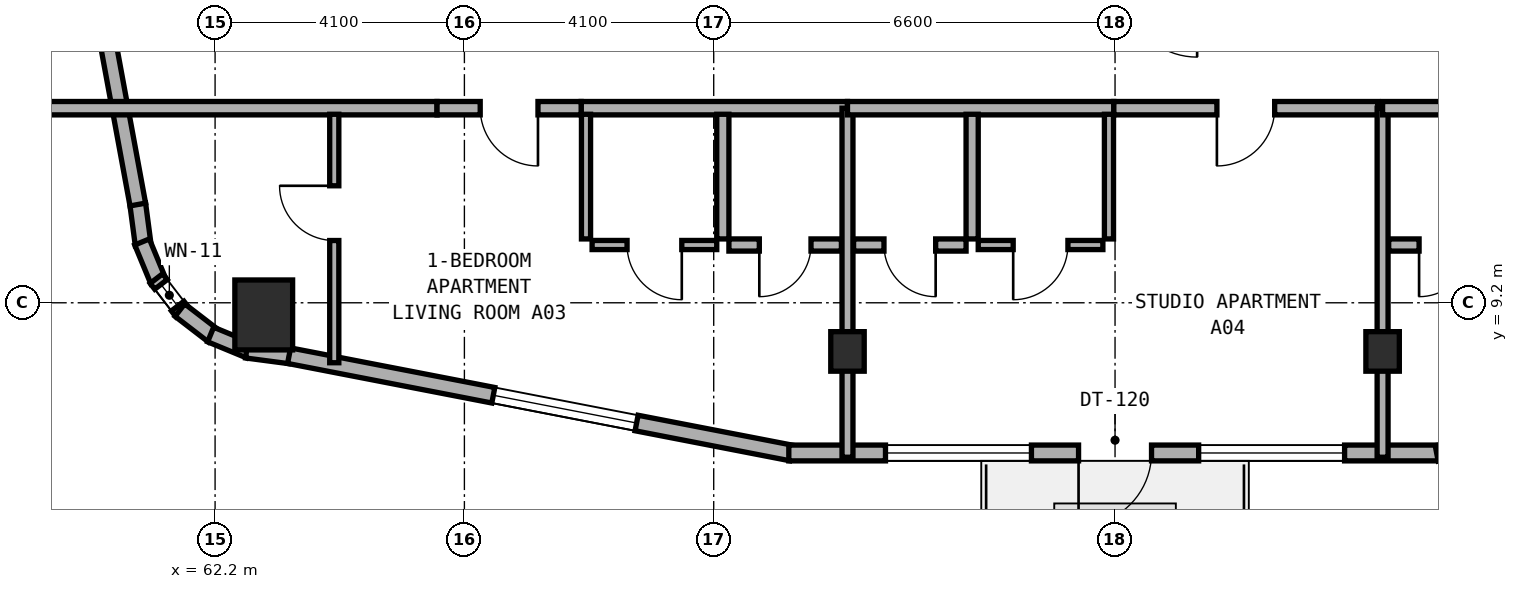
"""IFC4 building model, lengths in metres.
Left out: names, types, materials, properties, quantities, classifications, styles, units other than length and angle.
Written with IfcOpenShell. Run it as: python <this file> out.ifc"""

import sys

from ifc_helpers import new_model, si_unit, direction, frame, frame_2d, origin, origin_2d, place, context, subcontext, project, spatial, rectangle, extrude, element, fill, save


model = new_model("IFC4")
c1 = context("Model", 3, precision=1e-05, world=origin(), true_north=direction((0.0, 1.0)))
c2 = subcontext(c1, "Body", "Model", "MODEL_VIEW")
j1 = project(units=[si_unit("LENGTHUNIT", "METRE"), si_unit("PLANEANGLEUNIT", "RADIAN")], contexts=[c1])
p1 = place(None, origin())
s1 = spatial("IfcSite", under=j1, at=p1, CompositionType="ELEMENT")
p2 = place(p1, origin())
s2 = spatial("IfcBuilding", under=s1, at=p2, CompositionType="ELEMENT")
p3 = place(p2, frame((0.0, 0.0, 124.0)))
s3 = spatial("IfcBuildingStorey", under=s2, at=p3, CompositionType="ELEMENT", Elevation=124.0)
for number, where, z_axis, x_axis in (
    (1, (72.6, 8.4, 0.0), (0.0, 0.0, 1.0), (1.0, 0.0, 0.0)),
    (2, (81.4, 8.4, 0.0), (0.0, 0.0, 1.0), (1.0, 0.0, 0.0)),
):
    element("IfcColumn", number, at=place(p3, frame(where, z_axis=z_axis, x_axis=x_axis)), inside=s3, PredefinedType="COLUMN", context=c2, shape_type="SweptSolid", body=[
        extrude(rectangle(XDim=0.55, YDim=0.65, at=origin_2d()), origin(), (0.0, 0.0, 1.0), 3.5),
    ])
p4 = place(p3, frame((63.0, 9.0, 0.0), z_axis=(0.0, 0.0, 1.0), x_axis=(1.0, 0.0, 0.0)))
e3 = element("IfcColumn", 3, at=p4, inside=s3, PredefinedType="COLUMN", context=c2, shape_type="SweptSolid", body=[
    extrude(rectangle(XDim=0.95, YDim=1.15, at=origin_2d()), origin(), (0.0, 0.0, 1.0), 3.5),
])
p5 = place(p3, frame((60.928, 10.825, 0.0), z_axis=(0.0, 0.0, 1.0), x_axis=(0.131667498923, -0.991293937098, 0.0)))
e4 = element("IfcWall", 4, at=p5, inside=s3, PredefinedType="STANDARD", context=c2, shape_type="SweptSolid", body=[
    extrude(rectangle(XDim=0.677, YDim=0.26, at=frame_2d((0.338, 0.0))), origin(), (0.0, 0.0, 1.0), 3.25),
])
p6 = place(p3, frame((60.999, 10.2, 0.0), z_axis=(0.0, 0.0, 1.0), x_axis=(0.381988976935, -0.924166879681, 0.0)))
e5 = element("IfcWall", 5, at=p6, inside=s3, PredefinedType="STANDARD", context=c2, shape_type="SweptSolid", body=[
    extrude(rectangle(XDim=0.693, YDim=0.26, at=frame_2d((0.347, 0.0))), origin(), (0.0, 0.0, 1.0), 3.25),
])
p7 = place(p3, frame((61.236, 9.599, 0.0), z_axis=(0.0, 0.0, 1.0), x_axis=(0.609472651958, -0.792807092876, 0.0)))
e6 = element("IfcWall", 6, at=p7, inside=s3, PredefinedType="STANDARD", context=c2, shape_type="SweptSolid", body=[
    extrude(rectangle(XDim=0.694, YDim=0.26, at=frame_2d((0.347, 0.0))), origin(), (0.0, 0.0, 1.0), 3.25),
])
p8 = place(p7, frame((0.122, 0.0, 0.85)))
e7 = element("IfcOpeningElement", 7, at=p8, cuts=e6, PredefinedType="OPENING", context=c2, shape_type="SweptSolid", body=[
    extrude(rectangle(XDim=0.45, YDim=1.5, at=frame_2d((0.225, 0.75))), frame((0.0, 0.14, 0.0), z_axis=(0.0, -1.0, 0.0), x_axis=(1.0, 0.0, 0.0)), (0.0, 0.0, 1.0), 0.28),
])
p9 = place(p3, frame((61.621, 9.08, 0.0), z_axis=(0.0, 0.0, 1.0), x_axis=(0.792506234191, -0.609863811657, 0.0)))
e8 = element("IfcWall", 8, at=p9, inside=s3, PredefinedType="STANDARD", context=c2, shape_type="SweptSolid", body=[
    extrude(rectangle(XDim=0.694, YDim=0.26, at=frame_2d((0.347, 0.0))), origin(), (0.0, 0.0, 1.0), 3.25),
])
p10 = place(p3, frame((62.127, 8.678, 0.0), z_axis=(0.0, 0.0, 1.0), x_axis=(0.92421822618, -0.381864727877, 0.0)))
e9 = element("IfcWall", 9, at=p10, inside=s3, PredefinedType="STANDARD", context=c2, shape_type="SweptSolid", body=[
    extrude(rectangle(XDim=0.694, YDim=0.26, at=frame_2d((0.347, 0.0))), origin(), (0.0, 0.0, 1.0), 3.25),
])
p11 = place(p3, frame((62.719, 8.421, 0.0), z_axis=(0.0, 0.0, 1.0), x_axis=(0.991433279471, -0.130614135366, 0.0)))
e10 = element("IfcWall", 10, at=p11, inside=s3, PredefinedType="STANDARD", context=c2, shape_type="SweptSolid", body=[
    extrude(rectangle(XDim=0.712, YDim=0.26, at=frame_2d((0.356, 0.0))), origin(), (0.0, 0.0, 1.0), 3.25),
])
p12 = place(p3, frame((63.417, 8.33, 0.0), z_axis=(0.0, 0.0, 1.0), x_axis=(0.98174070399, -0.190224052445, 0.0)))
e11 = element("IfcWall", 11, at=p12, inside=s3, PredefinedType="STANDARD", context=c2, shape_type="SweptSolid", body=[
    extrude(rectangle(XDim=8.412, YDim=0.26, at=frame_2d((4.206, 0.0))), origin(), (0.0, 0.0, 1.0), 3.25),
])
p13 = place(p12, frame((3.421, 0.0, 0.8)))
e12 = element("IfcOpeningElement", 12, at=p13, cuts=e11, PredefinedType="OPENING", context=c2, shape_type="SweptSolid", body=[
    extrude(rectangle(XDim=2.4, YDim=1.6, at=frame_2d((1.2, 0.8))), frame((0.0, 0.14, 0.0), z_axis=(0.0, -1.0, 0.0), x_axis=(1.0, 0.0, 0.0)), (0.0, 0.0, 1.0), 0.28),
])
p14 = place(p3, frame((71.635, 6.73, 0.0), z_axis=(0.0, 0.0, 1.0), x_axis=(1.0, 0.0, 0.0)))
e13 = element("IfcWall", 13, at=p14, inside=s3, PredefinedType="STANDARD", context=c2, shape_type="SweptSolid", body=[
    extrude(rectangle(XDim=10.695, YDim=0.26, at=frame_2d((5.348, 0.0))), origin(), (0.0, 0.0, 1.0), 3.25),
])
p15 = place(p14, frame((4.765, 0.0, 0.0)))
e14 = element("IfcOpeningElement", 14, at=p15, cuts=e13, PredefinedType="OPENING", context=c2, shape_type="SweptSolid", body=[
    extrude(rectangle(XDim=1.2, YDim=2.15, at=frame_2d((0.6, 1.075))), frame((0.0, 0.14, 0.0), z_axis=(0.0, -1.0, 0.0), x_axis=(1.0, 0.0, 0.0)), (0.0, 0.0, 1.0), 0.28),
])
p16 = place(p14, frame((1.59, 0.0, 0.8)))
e15 = element("IfcOpeningElement", 15, at=p16, cuts=e13, PredefinedType="OPENING", context=c2, shape_type="SweptSolid", body=[
    extrude(rectangle(XDim=2.4, YDim=1.6, at=frame_2d((1.2, 0.8))), frame((0.0, 0.14, 0.0), z_axis=(0.0, -1.0, 0.0), x_axis=(1.0, 0.0, 0.0)), (0.0, 0.0, 1.0), 0.28),
])
p17 = place(p14, frame((6.74, 0.0, 0.8)))
e16 = element("IfcOpeningElement", 16, at=p17, cuts=e13, PredefinedType="OPENING", context=c2, shape_type="SweptSolid", body=[
    extrude(rectangle(XDim=2.4, YDim=1.6, at=frame_2d((1.2, 0.8))), frame((0.0, 0.14, 0.0), z_axis=(0.0, -1.0, 0.0), x_axis=(1.0, 0.0, 0.0)), (0.0, 0.0, 1.0), 0.28),
])
p18 = place(p3, frame((82.29, 6.723, 0.0), z_axis=(0.0, 0.0, 1.0), x_axis=(0.981733729692, 0.190260043057, 0.0)))
e17 = element("IfcWall", 17, at=p18, inside=s3, PredefinedType="STANDARD", context=c2, shape_type="SweptSolid", body=[
    extrude(rectangle(XDim=8.447, YDim=0.26, at=frame_2d((4.224, 0.0))), origin(), (0.0, 0.0, 1.0), 3.25),
])
p19 = place(p18, frame((2.608, 0.0, 0.8)))
e18 = element("IfcOpeningElement", 18, at=p19, cuts=e17, PredefinedType="OPENING", context=c2, shape_type="SweptSolid", body=[
    extrude(rectangle(XDim=2.4, YDim=1.6, at=frame_2d((1.2, 0.8))), frame((0.0, 0.14, 0.0), z_axis=(0.0, -1.0, 0.0), x_axis=(1.0, 0.0, 0.0)), (0.0, 0.0, 1.0), 0.28),
])
p20 = place(p3, frame((59.318, 19.558, 0.0), z_axis=(0.0, 0.0, 1.0), x_axis=(0.181209963057, -0.983444431215, 0.0)))
e19 = element("IfcWall", 19, at=p20, inside=s3, PredefinedType="STANDARD", context=c2, shape_type="SweptSolid", body=[
    extrude(rectangle(XDim=8.889, YDim=0.26, at=frame_2d((4.445, 0.0))), origin(), (0.0, 0.0, 1.0), 3.25),
])
p21 = place(p20, frame((1.444, 0.0, 0.8)))
e20 = element("IfcOpeningElement", 20, at=p21, cuts=e19, PredefinedType="OPENING", context=c2, shape_type="SweptSolid", body=[
    extrude(rectangle(XDim=2.4, YDim=1.6, at=frame_2d((1.2, 0.8))), frame((0.0, 0.14, 0.0), z_axis=(0.0, -1.0, 0.0), x_axis=(1.0, 0.0, 0.0)), (0.0, 0.0, 1.0), 0.28),
])
p22 = place(p3, frame((59.36, 12.4, 0.0), z_axis=(0.0, 0.0, 1.0), x_axis=(1.0, 0.0, 0.0)))
e21 = element("IfcWall", 21, at=p22, inside=s3, PredefinedType="SOLIDWALL", context=c2, shape_type="SweptSolid", body=[
    extrude(rectangle(XDim=6.49, YDim=0.22, at=frame_2d((3.245, 0.0))), origin(), (0.0, 0.0, 1.0), 2.945),
])
p23 = place(p3, frame((68.22, 12.4, 0.0), z_axis=(0.0, 0.0, 1.0), x_axis=(1.0, 0.0, 0.0)))
e22 = element("IfcWall", 22, at=p23, inside=s3, PredefinedType="SOLIDWALL", context=c2, shape_type="SweptSolid", body=[
    extrude(rectangle(XDim=4.38, YDim=0.22, at=frame_2d((2.19, 0.0))), origin(), (0.0, 0.0, 1.0), 2.825),
])
p24 = place(p3, frame((65.85, 12.4, 0.0), z_axis=(0.0, 0.0, 1.0), x_axis=(1.0, 0.0, 0.0)))
e23 = element("IfcWall", 23, at=p24, inside=s3, PredefinedType="SOLIDWALL", context=c2, shape_type="SweptSolid", body=[
    extrude(rectangle(XDim=2.37, YDim=0.22, at=frame_2d((1.185, 0.0))), origin(), (0.0, 0.0, 1.0), 3.22),
])
p25 = place(p24, frame((0.71, 0.0, 0.0)))
e24 = element("IfcOpeningElement", 24, at=p25, cuts=e23, PredefinedType="OPENING", context=c2, shape_type="SweptSolid", body=[
    extrude(rectangle(XDim=0.95, YDim=2.1, at=frame_2d((0.475, 1.05))), frame((0.0, 0.12, 0.0), z_axis=(0.0, -1.0, 0.0), x_axis=(1.0, 0.0, 0.0)), (0.0, 0.0, 1.0), 0.24),
])
p26 = place(p3, frame((64.16, 8.214, 0.0), z_axis=(0.0, 0.0, 1.0), x_axis=(0.0, 1.0, 0.0)))
e25 = element("IfcWall", 25, at=p26, inside=s3, PredefinedType="PARTITIONING", context=c2, shape_type="SweptSolid", body=[
    extrude(rectangle(XDim=4.086, YDim=0.15, at=frame_2d((2.043, 0.0))), origin(), (0.0, 0.0, 1.0), 2.945),
])
p27 = place(p26, frame((2.01, 0.0, 0.0)))
e26 = element("IfcOpeningElement", 26, at=p27, cuts=e25, PredefinedType="OPENING", context=c2, shape_type="SweptSolid", body=[
    extrude(rectangle(XDim=0.9, YDim=2.1, at=frame_2d((0.45, 1.05))), frame((0.0, 0.085, 0.0), z_axis=(0.0, -1.0, 0.0), x_axis=(1.0, 0.0, 0.0)), (0.0, 0.0, 1.0), 0.17),
])
p28 = place(p3, frame((70.55, 10.25, 0.0), z_axis=(0.0, 0.0, 1.0), x_axis=(0.0, 1.0, 0.0)))
e27 = element("IfcWall", 27, at=p28, inside=s3, PredefinedType="PLUMBINGWALL", context=c2, shape_type="SweptSolid", body=[
    extrude(rectangle(XDim=2.05, YDim=0.2, at=frame_2d((1.025, 0.0))), origin(), (0.0, 0.0, 1.0), 3.22),
])
p29 = place(p3, frame((68.3, 10.25, 0.0), z_axis=(0.0, 0.0, 1.0), x_axis=(0.0, 1.0, 0.0)))
e28 = element("IfcWall", 28, at=p29, inside=s3, PredefinedType="PARTITIONING", context=c2, shape_type="SweptSolid", body=[
    extrude(rectangle(XDim=2.05, YDim=0.15, at=frame_2d((1.025, 0.0))), origin(), (0.0, 0.0, 1.0), 3.22),
])
p30 = place(p3, frame((70.65, 10.15, 0.0), z_axis=(0.0, 0.0, 1.0), x_axis=(1.0, 0.0, 0.0)))
e29 = element("IfcWall", 29, at=p30, inside=s3, PredefinedType="PLUMBINGWALL", context=c2, shape_type="SweptSolid", body=[
    extrude(rectangle(XDim=1.85, YDim=0.2, at=frame_2d((0.925, 0.0))), origin(), (0.0, 0.0, 1.0), 3.22),
])
p31 = place(p30, frame((0.5, 0.0, 0.0)))
e30 = element("IfcOpeningElement", 30, at=p31, cuts=e29, PredefinedType="OPENING", context=c2, shape_type="SweptSolid", body=[
    extrude(rectangle(XDim=0.85, YDim=2.1, at=frame_2d((0.425, 1.05))), frame((0.0, 0.11, 0.0), z_axis=(0.0, -1.0, 0.0), x_axis=(1.0, 0.0, 0.0)), (0.0, 0.0, 1.0), 0.22),
])
p32 = place(p3, frame((68.4, 10.15, 0.0), z_axis=(0.0, 0.0, 1.0), x_axis=(1.0, 0.0, 0.0)))
e31 = element("IfcWall", 31, at=p32, inside=s3, PredefinedType="PARTITIONING", context=c2, shape_type="SweptSolid", body=[
    extrude(rectangle(XDim=2.05, YDim=0.15, at=frame_2d((1.025, 0.0))), origin(), (0.0, 0.0, 1.0), 3.22),
])
p33 = place(p32, frame((0.575, 0.0, 0.0)))
e32 = element("IfcOpeningElement", 32, at=p33, cuts=e31, PredefinedType="OPENING", context=c2, shape_type="SweptSolid", body=[
    extrude(rectangle(XDim=0.9, YDim=2.1, at=frame_2d((0.45, 1.05))), frame((0.0, 0.085, 0.0), z_axis=(0.0, -1.0, 0.0), x_axis=(1.0, 0.0, 0.0)), (0.0, 0.0, 1.0), 0.17),
])
p34 = place(p3, frame((72.6, 6.66, 0.0), z_axis=(0.0, 0.0, 1.0), x_axis=(0.0, 1.0, 0.0)))
e33 = element("IfcWall", 33, at=p34, inside=s3, PredefinedType="SOLIDWALL", context=c2, shape_type="SweptSolid", body=[
    extrude(rectangle(XDim=5.74, YDim=0.18, at=frame_2d((2.87, 0.0))), origin(), (0.0, 0.0, 1.0), 2.825),
])
p35 = place(p3, frame((72.6, 12.4, 0.0), z_axis=(0.0, 0.0, 1.0), x_axis=(1.0, 0.0, 0.0)))
e34 = element("IfcWall", 34, at=p35, inside=s3, PredefinedType="SOLIDWALL", context=c2, shape_type="SweptSolid", body=[
    extrude(rectangle(XDim=4.38, YDim=0.22, at=frame_2d((2.19, 0.0))), origin(), (0.0, 0.0, 1.0), 2.825),
])
p36 = place(p3, frame((76.98, 12.4, 0.0), z_axis=(0.0, 0.0, 1.0), x_axis=(1.0, 0.0, 0.0)))
e35 = element("IfcWall", 35, at=p36, inside=s3, PredefinedType="SOLIDWALL", context=c2, shape_type="SweptSolid", body=[
    extrude(rectangle(XDim=4.34, YDim=0.22, at=frame_2d((2.17, 0.0))), origin(), (0.0, 0.0, 1.0), 2.825),
])
p37 = place(p36, frame((1.695, 0.0, 0.0)))
e36 = element("IfcOpeningElement", 36, at=p37, cuts=e35, PredefinedType="OPENING", context=c2, shape_type="SweptSolid", body=[
    extrude(rectangle(XDim=0.95, YDim=2.1, at=frame_2d((0.475, 1.05))), frame((0.0, 0.12, 0.0), z_axis=(0.0, -1.0, 0.0), x_axis=(1.0, 0.0, 0.0)), (0.0, 0.0, 1.0), 0.24),
])
p38 = place(p3, frame((74.65, 10.25, 0.0), z_axis=(0.0, 0.0, 1.0), x_axis=(0.0, 1.0, 0.0)))
e37 = element("IfcWall", 37, at=p38, inside=s3, PredefinedType="PLUMBINGWALL", context=c2, shape_type="SweptSolid", body=[
    extrude(rectangle(XDim=2.05, YDim=0.2, at=frame_2d((1.025, 0.0))), origin(), (0.0, 0.0, 1.0), 2.985),
])
p39 = place(p3, frame((76.9, 10.25, 0.0), z_axis=(0.0, 0.0, 1.0), x_axis=(0.0, 1.0, 0.0)))
e38 = element("IfcWall", 38, at=p39, inside=s3, PredefinedType="PARTITIONING", context=c2, shape_type="SweptSolid", body=[
    extrude(rectangle(XDim=2.05, YDim=0.15, at=frame_2d((1.025, 0.0))), origin(), (0.0, 0.0, 1.0), 2.985),
])
p40 = place(p3, frame((72.7, 10.15, 0.0), z_axis=(0.0, 0.0, 1.0), x_axis=(1.0, 0.0, 0.0)))
e39 = element("IfcWall", 39, at=p40, inside=s3, PredefinedType="PLUMBINGWALL", context=c2, shape_type="SweptSolid", body=[
    extrude(rectangle(XDim=1.85, YDim=0.2, at=frame_2d((0.925, 0.0))), origin(), (0.0, 0.0, 1.0), 3.22),
])
p41 = place(p40, frame((0.5, 0.0, 0.0)))
e40 = element("IfcOpeningElement", 40, at=p41, cuts=e39, PredefinedType="OPENING", context=c2, shape_type="SweptSolid", body=[
    extrude(rectangle(XDim=0.85, YDim=2.1, at=frame_2d((0.425, 1.05))), frame((0.0, 0.11, 0.0), z_axis=(0.0, -1.0, 0.0), x_axis=(1.0, 0.0, 0.0)), (0.0, 0.0, 1.0), 0.22),
])
p42 = place(p3, frame((74.75, 10.15, 0.0), z_axis=(0.0, 0.0, 1.0), x_axis=(1.0, 0.0, 0.0)))
e41 = element("IfcWall", 41, at=p42, inside=s3, PredefinedType="PARTITIONING", context=c2, shape_type="SweptSolid", body=[
    extrude(rectangle(XDim=2.05, YDim=0.15, at=frame_2d((1.025, 0.0))), origin(), (0.0, 0.0, 1.0), 3.22),
])
p43 = place(p42, frame((0.575, 0.0, 0.0)))
e42 = element("IfcOpeningElement", 42, at=p43, cuts=e41, PredefinedType="OPENING", context=c2, shape_type="SweptSolid", body=[
    extrude(rectangle(XDim=0.9, YDim=2.1, at=frame_2d((0.45, 1.05))), frame((0.0, 0.085, 0.0), z_axis=(0.0, -1.0, 0.0), x_axis=(1.0, 0.0, 0.0)), (0.0, 0.0, 1.0), 0.17),
])
p44 = place(p3, frame((81.4, 6.66, 0.0), z_axis=(0.0, 0.0, 1.0), x_axis=(0.0, 1.0, 0.0)))
e43 = element("IfcWall", 43, at=p44, inside=s3, PredefinedType="SOLIDWALL", context=c2, shape_type="SweptSolid", body=[
    extrude(rectangle(XDim=5.74, YDim=0.18, at=frame_2d((2.87, 0.0))), origin(), (0.0, 0.0, 1.0), 2.825),
])
p45 = place(p3, frame((81.4, 12.4, 0.0), z_axis=(0.0, 0.0, 1.0), x_axis=(1.0, 0.0, 0.0)))
e44 = element("IfcWall", 44, at=p45, inside=s3, PredefinedType="SOLIDWALL", context=c2, shape_type="SweptSolid", body=[
    extrude(rectangle(XDim=4.38, YDim=0.22, at=frame_2d((2.19, 0.0))), origin(), (0.0, 0.0, 1.0), 2.825),
])
p46 = place(p3, frame((81.5, 10.15, 0.0), z_axis=(0.0, 0.0, 1.0), x_axis=(1.0, 0.0, 0.0)))
e45 = element("IfcWall", 45, at=p46, inside=s3, PredefinedType="PLUMBINGWALL", context=c2, shape_type="SweptSolid", body=[
    extrude(rectangle(XDim=1.85, YDim=0.2, at=frame_2d((0.925, 0.0))), origin(), (0.0, 0.0, 1.0), 2.825),
])
p47 = place(p46, frame((0.5, 0.0, 0.0)))
e46 = element("IfcOpeningElement", 46, at=p47, cuts=e45, PredefinedType="OPENING", context=c2, shape_type="SweptSolid", body=[
    extrude(rectangle(XDim=0.85, YDim=2.1, at=frame_2d((0.425, 1.05))), frame((0.0, 0.11, 0.0), z_axis=(0.0, -1.0, 0.0), x_axis=(1.0, 0.0, 0.0)), (0.0, 0.0, 1.0), 0.22),
])
p48 = place(p13, origin())
e47 = element("IfcWindow", 47, at=p48, inside=s3, PartitioningType="SINGLE_PANEL", PredefinedType="WINDOW", context=c2, shape_type="SweptSolid", body=[
    extrude(rectangle(XDim=2.4, YDim=1.6, at=frame_2d((1.2, 0.8))), frame((0.0, 0.03, 0.0), z_axis=(0.0, -1.0, 0.0), x_axis=(1.0, 0.0, 0.0)), (0.0, 0.0, 1.0), 0.06),
])
fill(e12, e47)
p49 = place(p15, frame((1.2, 0.0, 0.0), z_axis=(0.0, 0.0, 1.0), x_axis=(-1.0, 0.0, 0.0)))
e48 = element("IfcDoor", 48, at=p49, inside=s3, OperationType="SINGLE_SWING_RIGHT", PredefinedType="DOOR", context=c2, shape_type="SweptSolid", body=[
    extrude(rectangle(XDim=1.2, YDim=2.15, at=frame_2d((0.6, 1.075))), frame((0.0, 0.025, 0.0), z_axis=(0.0, -1.0, 0.0), x_axis=(1.0, 0.0, 0.0)), (0.0, 0.0, 1.0), 0.05),
])
fill(e14, e48)
p50 = place(p16, origin())
e49 = element("IfcWindow", 49, at=p50, inside=s3, PartitioningType="SINGLE_PANEL", PredefinedType="WINDOW", context=c2, shape_type="SweptSolid", body=[
    extrude(rectangle(XDim=2.4, YDim=1.6, at=frame_2d((1.2, 0.8))), frame((0.0, 0.03, 0.0), z_axis=(0.0, -1.0, 0.0), x_axis=(1.0, 0.0, 0.0)), (0.0, 0.0, 1.0), 0.06),
])
fill(e15, e49)
p51 = place(p17, origin())
e50 = element("IfcWindow", 50, at=p51, inside=s3, PartitioningType="SINGLE_PANEL", PredefinedType="WINDOW", context=c2, shape_type="SweptSolid", body=[
    extrude(rectangle(XDim=2.4, YDim=1.6, at=frame_2d((1.2, 0.8))), frame((0.0, 0.03, 0.0), z_axis=(0.0, -1.0, 0.0), x_axis=(1.0, 0.0, 0.0)), (0.0, 0.0, 1.0), 0.06),
])
fill(e16, e50)
p52 = place(p8, origin())
e51 = element("IfcWindow", 51, at=p52, inside=s3, PartitioningType="SINGLE_PANEL", PredefinedType="WINDOW", context=c2, shape_type="SweptSolid", body=[
    extrude(rectangle(XDim=0.45, YDim=1.5, at=frame_2d((0.225, 0.75))), frame((0.0, 0.03, 0.0), z_axis=(0.0, -1.0, 0.0), x_axis=(1.0, 0.0, 0.0)), (0.0, 0.0, 1.0), 0.06),
])
fill(e7, e51)
p53 = place(p25, frame((0.95, 0.0, 0.0), z_axis=(0.0, 0.0, 1.0), x_axis=(-1.0, 0.0, 0.0)))
e52 = element("IfcDoor", 52, at=p53, inside=s3, OperationType="SINGLE_SWING_LEFT", PredefinedType="DOOR", context=c2, shape_type="SweptSolid", body=[
    extrude(rectangle(XDim=0.95, YDim=2.1, at=frame_2d((0.475, 1.05))), frame((0.0, 0.025, 0.0), z_axis=(0.0, -1.0, 0.0), x_axis=(1.0, 0.0, 0.0)), (0.0, 0.0, 1.0), 0.05),
])
fill(e24, e52)
p54 = place(p27, origin())
e53 = element("IfcDoor", 53, at=p54, inside=s3, OperationType="SINGLE_SWING_RIGHT", PredefinedType="DOOR", context=c2, shape_type="SweptSolid", body=[
    extrude(rectangle(XDim=0.9, YDim=2.1, at=frame_2d((0.45, 1.05))), frame((0.0, 0.025, 0.0), z_axis=(0.0, -1.0, 0.0), x_axis=(1.0, 0.0, 0.0)), (0.0, 0.0, 1.0), 0.05),
])
fill(e26, e53)
p55 = place(p31, frame((0.85, 0.0, 0.0), z_axis=(0.0, 0.0, 1.0), x_axis=(-1.0, 0.0, 0.0)))
e54 = element("IfcDoor", 54, at=p55, inside=s3, OperationType="SINGLE_SWING_RIGHT", PredefinedType="DOOR", context=c2, shape_type="SweptSolid", body=[
    extrude(rectangle(XDim=0.85, YDim=2.1, at=frame_2d((0.425, 1.05))), frame((0.0, 0.025, 0.0), z_axis=(0.0, -1.0, 0.0), x_axis=(1.0, 0.0, 0.0)), (0.0, 0.0, 1.0), 0.05),
])
fill(e30, e54)
p56 = place(p33, frame((0.9, 0.0, 0.0), z_axis=(0.0, 0.0, 1.0), x_axis=(-1.0, 0.0, 0.0)))
e55 = element("IfcDoor", 55, at=p56, inside=s3, OperationType="SINGLE_SWING_LEFT", PredefinedType="DOOR", context=c2, shape_type="SweptSolid", body=[
    extrude(rectangle(XDim=0.9, YDim=2.1, at=frame_2d((0.45, 1.05))), frame((0.0, 0.025, 0.0), z_axis=(0.0, -1.0, 0.0), x_axis=(1.0, 0.0, 0.0)), (0.0, 0.0, 1.0), 0.05),
])
fill(e32, e55)
p57 = place(p37, frame((0.95, 0.0, 0.0), z_axis=(0.0, 0.0, 1.0), x_axis=(-1.0, 0.0, 0.0)))
e56 = element("IfcDoor", 56, at=p57, inside=s3, OperationType="SINGLE_SWING_RIGHT", PredefinedType="DOOR", context=c2, shape_type="SweptSolid", body=[
    extrude(rectangle(XDim=0.95, YDim=2.1, at=frame_2d((0.475, 1.05))), frame((0.0, 0.025, 0.0), z_axis=(0.0, -1.0, 0.0), x_axis=(1.0, 0.0, 0.0)), (0.0, 0.0, 1.0), 0.05),
])
fill(e36, e56)
p58 = place(p41, frame((0.85, 0.0, 0.0), z_axis=(0.0, 0.0, 1.0), x_axis=(-1.0, 0.0, 0.0)))
e57 = element("IfcDoor", 57, at=p58, inside=s3, OperationType="SINGLE_SWING_LEFT", PredefinedType="DOOR", context=c2, shape_type="SweptSolid", body=[
    extrude(rectangle(XDim=0.85, YDim=2.1, at=frame_2d((0.425, 1.05))), frame((0.0, 0.025, 0.0), z_axis=(0.0, -1.0, 0.0), x_axis=(1.0, 0.0, 0.0)), (0.0, 0.0, 1.0), 0.05),
])
fill(e40, e57)
p59 = place(p43, frame((0.9, 0.0, 0.0), z_axis=(0.0, 0.0, 1.0), x_axis=(-1.0, 0.0, 0.0)))
e58 = element("IfcDoor", 58, at=p59, inside=s3, OperationType="SINGLE_SWING_RIGHT", PredefinedType="DOOR", context=c2, shape_type="SweptSolid", body=[
    extrude(rectangle(XDim=0.9, YDim=2.1, at=frame_2d((0.45, 1.05))), frame((0.0, 0.025, 0.0), z_axis=(0.0, -1.0, 0.0), x_axis=(1.0, 0.0, 0.0)), (0.0, 0.0, 1.0), 0.05),
])
fill(e42, e58)
p60 = place(p47, frame((0.85, 0.0, 0.0), z_axis=(0.0, 0.0, 1.0), x_axis=(-1.0, 0.0, 0.0)))
e59 = element("IfcDoor", 59, at=p60, inside=s3, OperationType="SINGLE_SWING_RIGHT", PredefinedType="DOOR", context=c2, shape_type="SweptSolid", body=[
    extrude(rectangle(XDim=0.85, YDim=2.1, at=frame_2d((0.425, 1.05))), frame((0.0, 0.025, 0.0), z_axis=(0.0, -1.0, 0.0), x_axis=(1.0, 0.0, 0.0)), (0.0, 0.0, 1.0), 0.05),
])
fill(e46, e59)
save(model, sys.argv[1])
